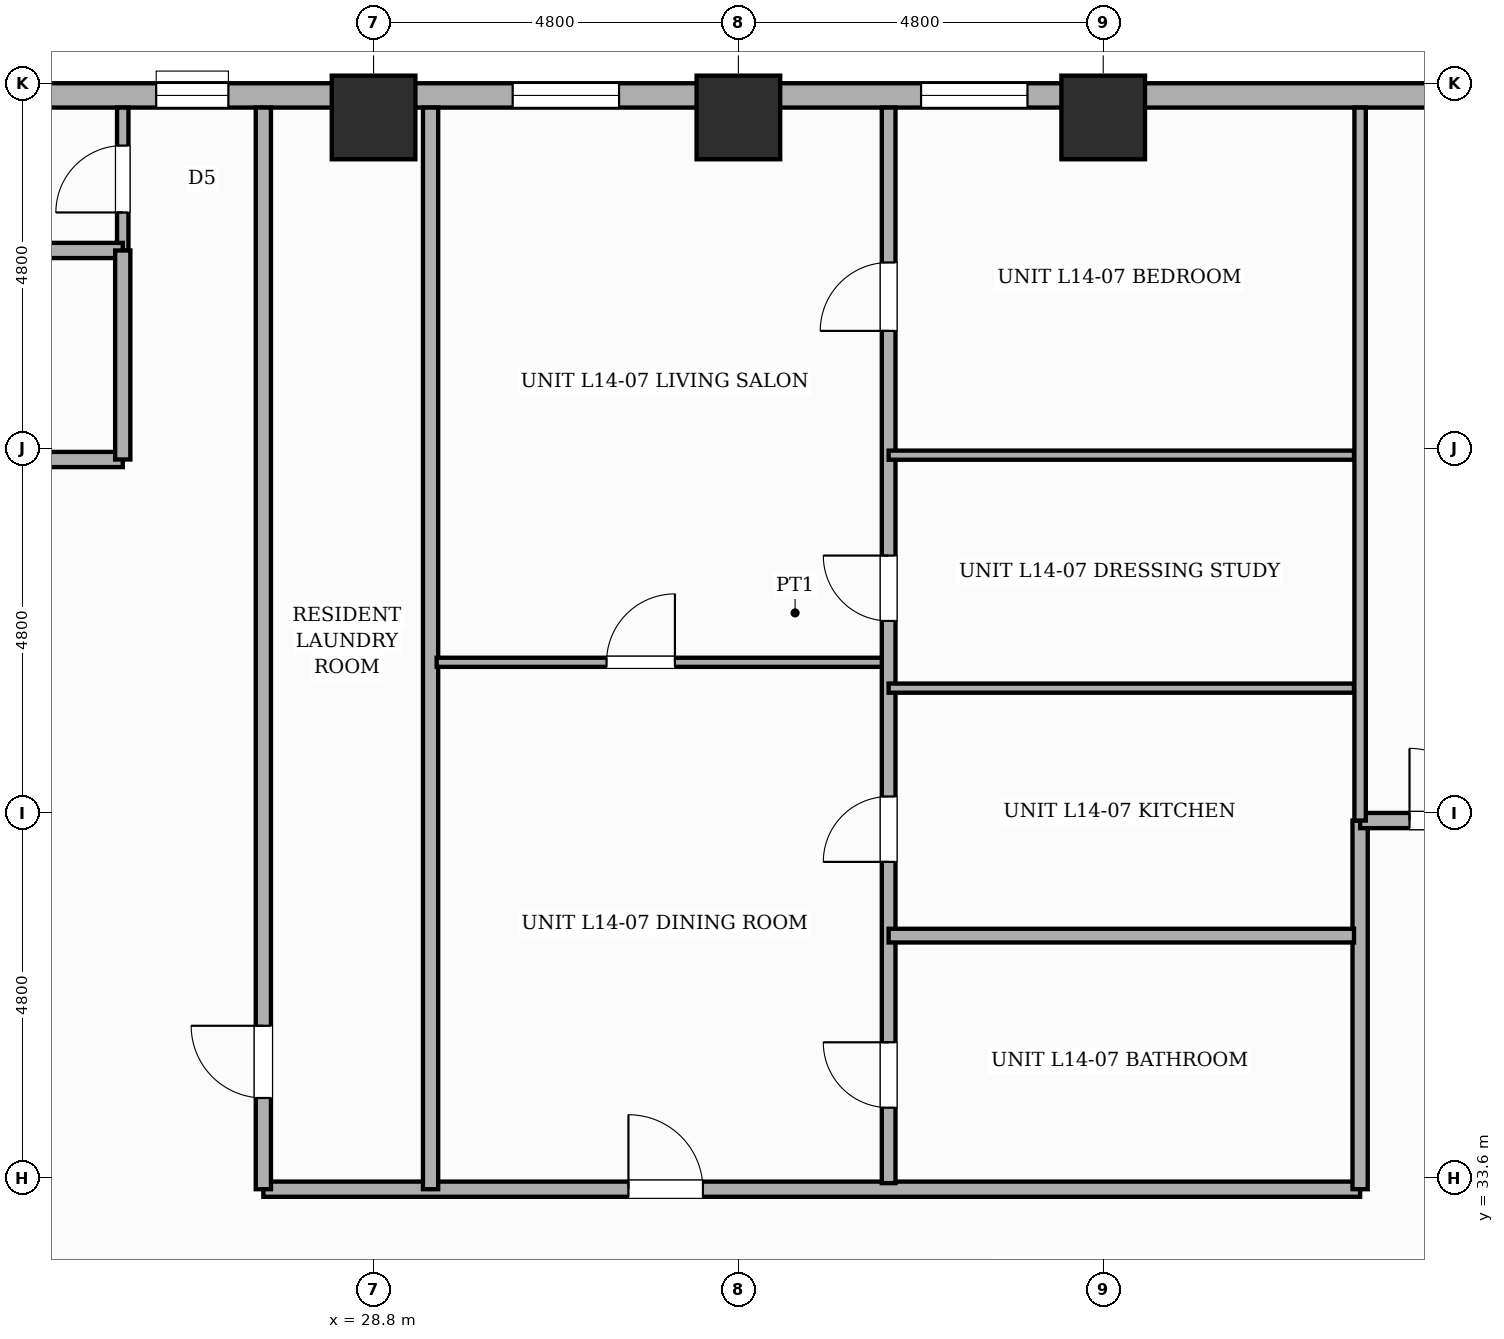
"""IFC4 building model, lengths in metres.
Left out: names, types, materials, properties, quantities, classifications, styles, units other than length and angle.
Written with IfcOpenShell. Run it as: python <this file> out.ifc"""

import sys

from ifc_helpers import new_model, si_unit, direction, frame, frame_2d, origin, origin_2d, place, context, subcontext, project, spatial, rectangle, extrude, element, fill, save


model = new_model("IFC4")
c1 = context("Model", 3, precision=1e-05, world=origin(), true_north=direction((0.0, 1.0)))
c2 = subcontext(c1, "Body", "Model", "MODEL_VIEW")
j1 = project(units=[si_unit("LENGTHUNIT", "METRE"), si_unit("PLANEANGLEUNIT", "RADIAN")], contexts=[c1])
p1 = place(None, origin())
s1 = spatial("IfcSite", under=j1, at=p1, CompositionType="ELEMENT")
p2 = place(p1, origin())
s2 = spatial("IfcBuilding", under=s1, at=p2, CompositionType="ELEMENT")
p3 = place(p2, frame((0.0, 0.0, 57.4)))
s3 = spatial("IfcBuildingStorey", under=s2, at=p3, CompositionType="ELEMENT", Elevation=57.4)
for number, where, z_axis, x_axis in (
    (1, (28.8, 47.55, 0.0), (0.0, 0.0, 1.0), (1.0, 0.0, 0.0)),
    (2, (33.6, 47.55, 0.0), (0.0, 0.0, 1.0), (1.0, 0.0, 0.0)),
    (3, (38.4, 47.55, 0.0), (0.0, 0.0, 1.0), (1.0, 0.0, 0.0)),
):
    element("IfcColumn", number, at=place(p3, frame(where, z_axis=z_axis, x_axis=x_axis)), inside=s3, PredefinedType="COLUMN", context=c2, shape_type="SweptSolid", body=[
        extrude(rectangle(XDim=1.1, YDim=1.1, at=origin_2d()), origin(), (0.0, 0.0, 1.0), 3.6),
    ])
p4 = place(p3, frame((7.2, 47.84, 0.0), z_axis=(0.0, 0.0, 1.0), x_axis=(1.0, 0.0, 0.0)))
e4 = element("IfcWall", 4, at=p4, inside=s3, PredefinedType="STANDARD", context=c2, shape_type="SweptSolid", body=[
    extrude(rectangle(XDim=48.0, YDim=0.32, at=frame_2d((24.0, 0.0))), origin(), (0.0, 0.0, 1.0), 2.53),
])
p5 = place(p4, frame((28.803, 0.0, 0.65)))
e5 = element("IfcOpeningElement", 5, at=p5, cuts=e4, PredefinedType="OPENING", context=c2, shape_type="SweptSolid", body=[
    extrude(rectangle(XDim=1.4, YDim=1.1, at=frame_2d((0.7, 0.55))), frame((0.0, 0.17, 0.0), z_axis=(0.0, -1.0, 0.0), x_axis=(1.0, 0.0, 0.0)), (0.0, 0.0, 1.0), 0.34),
])
p6 = place(p4, frame((43.414, 0.0, 0.45)))
e6 = element("IfcOpeningElement", 6, at=p6, cuts=e4, PredefinedType="OPENING", context=c2, shape_type="SweptSolid", body=[
    extrude(rectangle(XDim=0.95, YDim=1.8, at=frame_2d((0.475, 0.9))), frame((0.0, 0.17, 0.0), z_axis=(0.0, -1.0, 0.0), x_axis=(1.0, 0.0, 0.0)), (0.0, 0.0, 1.0), 0.34),
])
p7 = place(p4, frame((18.74, 0.0, 0.45)))
e7 = element("IfcOpeningElement", 7, at=p7, cuts=e4, PredefinedType="OPENING", context=c2, shape_type="SweptSolid", body=[
    extrude(rectangle(XDim=0.95, YDim=1.8, at=frame_2d((0.475, 0.9))), frame((0.0, 0.17, 0.0), z_axis=(0.0, -1.0, 0.0), x_axis=(1.0, 0.0, 0.0)), (0.0, 0.0, 1.0), 0.34),
])
p8 = place(p4, frame((37.825, 0.0, 0.65)))
e8 = element("IfcOpeningElement", 8, at=p8, cuts=e4, PredefinedType="OPENING", context=c2, shape_type="SweptSolid", body=[
    extrude(rectangle(XDim=1.4, YDim=1.1, at=frame_2d((0.7, 0.55))), frame((0.0, 0.17, 0.0), z_axis=(0.0, -1.0, 0.0), x_axis=(1.0, 0.0, 0.0)), (0.0, 0.0, 1.0), 0.34),
])
p9 = place(p4, frame((0.47, 0.0, 0.45)))
e9 = element("IfcOpeningElement", 9, at=p9, cuts=e4, PredefinedType="OPENING", context=c2, shape_type="SweptSolid", body=[
    extrude(rectangle(XDim=0.95, YDim=1.8, at=frame_2d((0.475, 0.9))), frame((0.0, 0.17, 0.0), z_axis=(0.0, -1.0, 0.0), x_axis=(1.0, 0.0, 0.0)), (0.0, 0.0, 1.0), 0.34),
])
p10 = place(p4, frame((5.265, 0.0, 0.45)))
e10 = element("IfcOpeningElement", 10, at=p10, cuts=e4, PredefinedType="OPENING", context=c2, shape_type="SweptSolid", body=[
    extrude(rectangle(XDim=0.95, YDim=1.8, at=frame_2d((0.475, 0.9))), frame((0.0, 0.17, 0.0), z_axis=(0.0, -1.0, 0.0), x_axis=(1.0, 0.0, 0.0)), (0.0, 0.0, 1.0), 0.34),
])
p11 = place(p4, frame((23.43, 0.0, 0.65)))
e11 = element("IfcOpeningElement", 11, at=p11, cuts=e4, PredefinedType="OPENING", context=c2, shape_type="SweptSolid", body=[
    extrude(rectangle(XDim=1.4, YDim=1.1, at=frame_2d((0.7, 0.55))), frame((0.0, 0.17, 0.0), z_axis=(0.0, -1.0, 0.0), x_axis=(1.0, 0.0, 0.0)), (0.0, 0.0, 1.0), 0.34),
])
p12 = place(p4, frame((41.809, 0.0, 0.45)))
e12 = element("IfcOpeningElement", 12, at=p12, cuts=e4, PredefinedType="OPENING", context=c2, shape_type="SweptSolid", body=[
    extrude(rectangle(XDim=0.95, YDim=1.8, at=frame_2d((0.475, 0.9))), frame((0.0, 0.17, 0.0), z_axis=(0.0, -1.0, 0.0), x_axis=(1.0, 0.0, 0.0)), (0.0, 0.0, 1.0), 0.34),
])
p13 = place(p3, frame((25.5, 45.8, 0.0), z_axis=(0.0, 0.0, 1.0), x_axis=(0.0, 1.0, 0.0)))
e13 = element("IfcWall", 13, at=p13, inside=s3, PredefinedType="PARTITIONING", context=c2, shape_type="SweptSolid", body=[
    extrude(rectangle(XDim=1.88, YDim=0.15, at=frame_2d((0.94, 0.0))), origin(), (0.0, 0.0, 1.0), 3.35),
])
p14 = place(p13, frame((0.5, 0.0, 0.0)))
e14 = element("IfcOpeningElement", 14, at=p14, cuts=e13, PredefinedType="OPENING", context=c2, shape_type="SweptSolid", body=[
    extrude(rectangle(XDim=0.88, YDim=2.1, at=frame_2d((0.44, 1.05))), frame((0.0, 0.085, 0.0), z_axis=(0.0, -1.0, 0.0), x_axis=(1.0, 0.0, 0.0)), (0.0, 0.0, 1.0), 0.17),
])
p15 = place(p3, frame((22.75, 45.8, 0.0), z_axis=(0.0, 0.0, 1.0), x_axis=(1.0, 0.0, 0.0)))
e15 = element("IfcWall", 15, at=p15, inside=s3, PredefinedType="PARTITIONING", context=c2, shape_type="SweptSolid", body=[
    extrude(rectangle(XDim=2.75, YDim=0.2, at=frame_2d((1.375, 0.0))), origin(), (0.0, 0.0, 1.0), 3.35),
])
p16 = place(p3, frame((27.35, 33.45, 0.0), z_axis=(0.0, 0.0, 1.0), x_axis=(1.0, 0.0, 0.0)))
e16 = element("IfcWall", 16, at=p16, inside=s3, PredefinedType="PARTITIONING", context=c2, shape_type="SweptSolid", body=[
    extrude(rectangle(XDim=14.43, YDim=0.2, at=frame_2d((7.215, 0.0))), origin(), (0.0, 0.0, 1.0), 3.35),
])
p17 = place(p16, frame((4.803, 0.0, 0.0)))
e17 = element("IfcOpeningElement", 17, at=p17, cuts=e16, PredefinedType="OPENING", context=c2, shape_type="SweptSolid", body=[
    extrude(rectangle(XDim=0.98, YDim=2.18, at=frame_2d((0.49, 1.09))), frame((0.0, 0.11, 0.0), z_axis=(0.0, -1.0, 0.0), x_axis=(1.0, 0.0, 0.0)), (0.0, 0.0, 1.0), 0.22),
])
p18 = place(p3, frame((27.35, 33.45, 0.0), z_axis=(0.0, 0.0, 1.0), x_axis=(0.0, 1.0, 0.0)))
e18 = element("IfcWall", 18, at=p18, inside=s3, PredefinedType="PARTITIONING", context=c2, shape_type="SweptSolid", body=[
    extrude(rectangle(XDim=14.23, YDim=0.2, at=frame_2d((7.115, 0.0))), origin(), (0.0, 0.0, 1.0), 3.35),
])
p19 = place(p18, frame((1.2, 0.0, 0.0)))
e19 = element("IfcOpeningElement", 19, at=p19, cuts=e18, PredefinedType="OPENING", context=c2, shape_type="SweptSolid", body=[
    extrude(rectangle(XDim=0.95, YDim=2.15, at=frame_2d((0.475, 1.075))), frame((0.0, 0.11, 0.0), z_axis=(0.0, -1.0, 0.0), x_axis=(1.0, 0.0, 0.0)), (0.0, 0.0, 1.0), 0.22),
])
p20 = place(p3, frame((22.75, 43.05, 0.0), z_axis=(0.0, 0.0, 1.0), x_axis=(1.0, 0.0, 0.0)))
e20 = element("IfcWall", 20, at=p20, inside=s3, PredefinedType="PARTITIONING", context=c2, shape_type="SweptSolid", body=[
    extrude(rectangle(XDim=2.75, YDim=0.2, at=frame_2d((1.375, 0.0))), origin(), (0.0, 0.0, 1.0), 2.53),
])
p21 = place(p3, frame((25.5, 43.05, 0.0), z_axis=(0.0, 0.0, 1.0), x_axis=(0.0, 1.0, 0.0)))
e21 = element("IfcWall", 21, at=p21, inside=s3, PredefinedType="PARTITIONING", context=c2, shape_type="SweptSolid", body=[
    extrude(rectangle(XDim=2.75, YDim=0.2, at=frame_2d((1.375, 0.0))), origin(), (0.0, 0.0, 1.0), 3.35),
])
p22 = place(p3, frame((41.78, 33.45, 0.0), z_axis=(0.0, 0.0, 1.0), x_axis=(0.0, 1.0, 0.0)))
e22 = element("IfcWall", 22, at=p22, inside=s3, PredefinedType="PARTITIONING", context=c2, shape_type="SweptSolid", body=[
    extrude(rectangle(XDim=4.85, YDim=0.2, at=frame_2d((2.425, 0.0))), origin(), (0.0, 0.0, 1.0), 3.35),
])
p23 = place(p3, frame((41.78, 38.3, 0.0), z_axis=(0.0, 0.0, 1.0), x_axis=(1.0, 0.0, 0.0)))
e23 = element("IfcWall", 23, at=p23, inside=s3, PredefinedType="PARTITIONING", context=c2, shape_type="SweptSolid", body=[
    extrude(rectangle(XDim=2.24, YDim=0.2, at=frame_2d((1.12, 0.0))), origin(), (0.0, 0.0, 1.0), 3.35),
])
p24 = place(p23, frame((0.65, 0.0, 0.0)))
e24 = element("IfcOpeningElement", 24, at=p24, cuts=e23, PredefinedType="OPENING", context=c2, shape_type="SweptSolid", body=[
    extrude(rectangle(XDim=0.95, YDim=2.15, at=frame_2d((0.475, 1.075))), frame((0.0, 0.11, 0.0), z_axis=(0.0, -1.0, 0.0), x_axis=(1.0, 0.0, 0.0)), (0.0, 0.0, 1.0), 0.22),
])
p25 = place(p3, frame((29.55, 33.45, 0.0), z_axis=(0.0, 0.0, 1.0), x_axis=(0.0, 1.0, 0.0)))
e25 = element("IfcWall", 25, at=p25, inside=s3, PredefinedType="SOLIDWALL", context=c2, shape_type="SweptSolid", body=[
    extrude(rectangle(XDim=14.23, YDim=0.2, at=frame_2d((7.115, 0.0))), origin(), (0.0, 0.0, 1.0), 3.35),
])
p26 = place(p3, frame((29.63, 40.382, 0.0), z_axis=(0.0, 0.0, 1.0), x_axis=(1.0, 0.0, 0.0)))
e26 = element("IfcWall", 26, at=p26, inside=s3, PredefinedType="PARTITIONING", context=c2, shape_type="SweptSolid", body=[
    extrude(rectangle(XDim=5.947, YDim=0.12, at=frame_2d((2.974, 0.0))), origin(), (0.0, 0.0, 1.0), 3.35),
])
p27 = place(p26, frame((2.235, 0.0, 0.0)))
e27 = element("IfcOpeningElement", 27, at=p27, cuts=e26, PredefinedType="OPENING", context=c2, shape_type="SweptSolid", body=[
    extrude(rectangle(XDim=0.9, YDim=2.15, at=frame_2d((0.45, 1.075))), frame((0.0, 0.07, 0.0), z_axis=(0.0, -1.0, 0.0), x_axis=(1.0, 0.0, 0.0)), (0.0, 0.0, 1.0), 0.14),
])
p28 = place(p3, frame((35.577, 33.53, 0.0), z_axis=(0.0, 0.0, 1.0), x_axis=(0.0, 1.0, 0.0)))
e28 = element("IfcWall", 28, at=p28, inside=s3, PredefinedType="PLUMBINGWALL", context=c2, shape_type="SweptSolid", body=[
    extrude(rectangle(XDim=14.15, YDim=0.18, at=frame_2d((7.075, 0.0))), origin(), (0.0, 0.0, 1.0), 3.35),
])
p29 = place(p28, frame((0.993, 0.0, 0.0)))
e29 = element("IfcOpeningElement", 29, at=p29, cuts=e28, PredefinedType="OPENING", context=c2, shape_type="SweptSolid", body=[
    extrude(rectangle(XDim=0.86, YDim=2.1, at=frame_2d((0.43, 1.05))), frame((0.0, 0.1, 0.0), z_axis=(0.0, -1.0, 0.0), x_axis=(1.0, 0.0, 0.0)), (0.0, 0.0, 1.0), 0.2),
])
p30 = place(p28, frame((4.226, 0.0, 0.0)))
e30 = element("IfcOpeningElement", 30, at=p30, cuts=e28, PredefinedType="OPENING", context=c2, shape_type="SweptSolid", body=[
    extrude(rectangle(XDim=0.86, YDim=2.1, at=frame_2d((0.43, 1.05))), frame((0.0, 0.1, 0.0), z_axis=(0.0, -1.0, 0.0), x_axis=(1.0, 0.0, 0.0)), (0.0, 0.0, 1.0), 0.2),
])
p31 = place(p28, frame((7.396, 0.0, 0.0)))
e31 = element("IfcOpeningElement", 31, at=p31, cuts=e28, PredefinedType="OPENING", context=c2, shape_type="SweptSolid", body=[
    extrude(rectangle(XDim=0.86, YDim=2.1, at=frame_2d((0.43, 1.05))), frame((0.0, 0.1, 0.0), z_axis=(0.0, -1.0, 0.0), x_axis=(1.0, 0.0, 0.0)), (0.0, 0.0, 1.0), 0.2),
])
p32 = place(p28, frame((11.212, 0.0, 0.0)))
e32 = element("IfcOpeningElement", 32, at=p32, cuts=e28, PredefinedType="OPENING", context=c2, shape_type="SweptSolid", body=[
    extrude(rectangle(XDim=0.9, YDim=2.15, at=frame_2d((0.45, 1.075))), frame((0.0, 0.1, 0.0), z_axis=(0.0, -1.0, 0.0), x_axis=(1.0, 0.0, 0.0)), (0.0, 0.0, 1.0), 0.2),
])
p33 = place(p3, frame((35.577, 36.786, 0.0), z_axis=(0.0, 0.0, 1.0), x_axis=(1.0, 0.0, 0.0)))
e33 = element("IfcWall", 33, at=p33, inside=s3, PredefinedType="PLUMBINGWALL", context=c2, shape_type="SweptSolid", body=[
    extrude(rectangle(XDim=6.123, YDim=0.18, at=frame_2d((3.062, 0.0))), origin(), (0.0, 0.0, 1.0), 3.35),
])
for number, where, z_axis, x_axis in (
    (34, (35.577, 40.042, 0.0), (0.0, 0.0, 1.0), (1.0, 0.0, 0.0)),
    (35, (35.577, 43.107, 0.0), (0.0, 0.0, 1.0), (1.0, 0.0, 0.0)),
):
    element("IfcWall", number, at=place(p3, frame(where, z_axis=z_axis, x_axis=x_axis)), inside=s3, PredefinedType="PARTITIONING", context=c2, shape_type="SweptSolid", body=[
        extrude(rectangle(XDim=6.123, YDim=0.12, at=frame_2d((3.062, 0.0))), origin(), (0.0, 0.0, 1.0), 3.35),
    ])
p34 = place(p3, frame((41.78, 38.3, 0.0), z_axis=(0.0, 0.0, 1.0), x_axis=(0.0, 1.0, 0.0)))
e36 = element("IfcWall", 36, at=p34, inside=s3, PredefinedType="PARTITIONING", context=c2, shape_type="SweptSolid", body=[
    extrude(rectangle(XDim=9.38, YDim=0.15, at=frame_2d((4.69, 0.0))), origin(), (0.0, 0.0, 1.0), 3.35),
])
p35 = place(p5, origin())
e37 = element("IfcWindow", 37, at=p35, inside=s3, PartitioningType="SINGLE_PANEL", PredefinedType="WINDOW", context=c2, shape_type="SweptSolid", body=[
    extrude(rectangle(XDim=1.4, YDim=1.1, at=frame_2d((0.7, 0.55))), frame((0.0, 0.03, 0.0), z_axis=(0.0, -1.0, 0.0), x_axis=(1.0, 0.0, 0.0)), (0.0, 0.0, 1.0), 0.06),
])
fill(e5, e37)
p36 = place(p7, origin())
e38 = element("IfcWindow", 38, at=p36, inside=s3, PartitioningType="SINGLE_PANEL", PredefinedType="WINDOW", context=c2, shape_type="SweptSolid", body=[
    extrude(rectangle(XDim=0.95, YDim=1.8, at=frame_2d((0.475, 0.9))), frame((0.0, 0.03, 0.0), z_axis=(0.0, -1.0, 0.0), x_axis=(1.0, 0.0, 0.0)), (0.0, 0.0, 1.0), 0.06),
])
fill(e7, e38)
p37 = place(p11, origin())
e39 = element("IfcWindow", 39, at=p37, inside=s3, PartitioningType="SINGLE_PANEL", PredefinedType="WINDOW", context=c2, shape_type="SweptSolid", body=[
    extrude(rectangle(XDim=1.4, YDim=1.1, at=frame_2d((0.7, 0.55))), frame((0.0, 0.03, 0.0), z_axis=(0.0, -1.0, 0.0), x_axis=(1.0, 0.0, 0.0)), (0.0, 0.0, 1.0), 0.06),
])
fill(e11, e39)
p38 = place(p14, origin())
e40 = element("IfcDoor", 40, at=p38, inside=s3, OperationType="SINGLE_SWING_LEFT", PredefinedType="DOOR", context=c2, shape_type="SweptSolid", body=[
    extrude(rectangle(XDim=0.88, YDim=2.1, at=frame_2d((0.44, 1.05))), frame((0.0, 0.025, 0.0), z_axis=(0.0, -1.0, 0.0), x_axis=(1.0, 0.0, 0.0)), (0.0, 0.0, 1.0), 0.05),
])
fill(e14, e40)
p39 = place(p19, origin())
e41 = element("IfcDoor", 41, at=p39, inside=s3, OperationType="SINGLE_SWING_RIGHT", PredefinedType="DOOR", context=c2, shape_type="SweptSolid", body=[
    extrude(rectangle(XDim=0.95, YDim=2.15, at=frame_2d((0.475, 1.075))), frame((0.0, 0.025, 0.0), z_axis=(0.0, -1.0, 0.0), x_axis=(1.0, 0.0, 0.0)), (0.0, 0.0, 1.0), 0.05),
])
fill(e19, e41)
p40 = place(p17, origin())
e42 = element("IfcDoor", 42, at=p40, inside=s3, OperationType="SINGLE_SWING_LEFT", PredefinedType="DOOR", context=c2, shape_type="SweptSolid", body=[
    extrude(rectangle(XDim=0.98, YDim=2.18, at=frame_2d((0.49, 1.09))), frame((0.0, 0.025, 0.0), z_axis=(0.0, -1.0, 0.0), x_axis=(1.0, 0.0, 0.0)), (0.0, 0.0, 1.0), 0.05),
])
fill(e17, e42)
p41 = place(p27, origin())
e43 = element("IfcDoor", 43, at=p41, inside=s3, OperationType="SINGLE_SWING_RIGHT", PredefinedType="DOOR", context=c2, shape_type="SweptSolid", body=[
    extrude(rectangle(XDim=0.9, YDim=2.15, at=frame_2d((0.45, 1.075))), frame((0.0, 0.025, 0.0), z_axis=(0.0, -1.0, 0.0), x_axis=(1.0, 0.0, 0.0)), (0.0, 0.0, 1.0), 0.05),
])
fill(e27, e43)
p42 = place(p29, origin())
e44 = element("IfcDoor", 44, at=p42, inside=s3, OperationType="SINGLE_SWING_RIGHT", PredefinedType="DOOR", context=c2, shape_type="SweptSolid", body=[
    extrude(rectangle(XDim=0.86, YDim=2.1, at=frame_2d((0.43, 1.05))), frame((0.0, 0.025, 0.0), z_axis=(0.0, -1.0, 0.0), x_axis=(1.0, 0.0, 0.0)), (0.0, 0.0, 1.0), 0.05),
])
fill(e29, e44)
p43 = place(p30, origin())
e45 = element("IfcDoor", 45, at=p43, inside=s3, OperationType="SINGLE_SWING_LEFT", PredefinedType="DOOR", context=c2, shape_type="SweptSolid", body=[
    extrude(rectangle(XDim=0.86, YDim=2.1, at=frame_2d((0.43, 1.05))), frame((0.0, 0.025, 0.0), z_axis=(0.0, -1.0, 0.0), x_axis=(1.0, 0.0, 0.0)), (0.0, 0.0, 1.0), 0.05),
])
fill(e30, e45)
p44 = place(p31, origin())
e46 = element("IfcDoor", 46, at=p44, inside=s3, OperationType="SINGLE_SWING_RIGHT", PredefinedType="DOOR", context=c2, shape_type="SweptSolid", body=[
    extrude(rectangle(XDim=0.86, YDim=2.1, at=frame_2d((0.43, 1.05))), frame((0.0, 0.025, 0.0), z_axis=(0.0, -1.0, 0.0), x_axis=(1.0, 0.0, 0.0)), (0.0, 0.0, 1.0), 0.05),
])
fill(e31, e46)
p45 = place(p32, origin())
e47 = element("IfcDoor", 47, at=p45, inside=s3, OperationType="SINGLE_SWING_LEFT", PredefinedType="DOOR", context=c2, shape_type="SweptSolid", body=[
    extrude(rectangle(XDim=0.9, YDim=2.15, at=frame_2d((0.45, 1.075))), frame((0.0, 0.025, 0.0), z_axis=(0.0, -1.0, 0.0), x_axis=(1.0, 0.0, 0.0)), (0.0, 0.0, 1.0), 0.05),
])
fill(e32, e47)
p46 = place(p24, origin())
e48 = element("IfcDoor", 48, at=p46, inside=s3, OperationType="SINGLE_SWING_LEFT", PredefinedType="DOOR", context=c2, shape_type="SweptSolid", body=[
    extrude(rectangle(XDim=0.95, YDim=2.15, at=frame_2d((0.475, 1.075))), frame((0.0, 0.025, 0.0), z_axis=(0.0, -1.0, 0.0), x_axis=(1.0, 0.0, 0.0)), (0.0, 0.0, 1.0), 0.05),
])
fill(e24, e48)
save(model, sys.argv[1])
